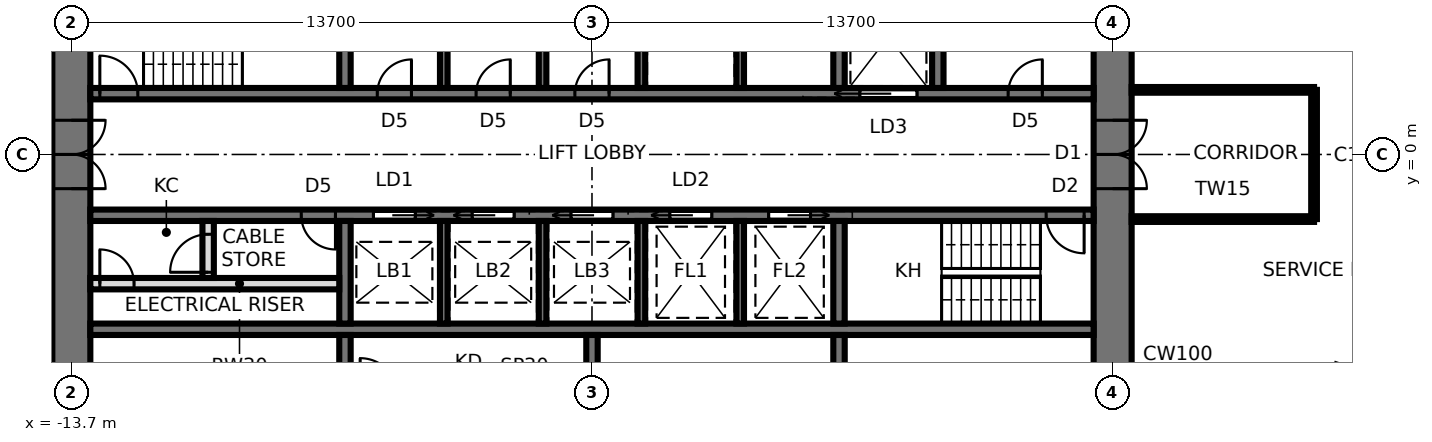
"""IFC4 building model, lengths in metres.
Left out: names, types, materials, properties, quantities, classifications, styles, units other than length and angle.
Written with IfcOpenShell. Run it as: python <this file> out.ifc"""

import sys

from ifc_helpers import new_model, si_unit, direction, frame, frame_2d, origin, place, context, subcontext, project, spatial, rectangle, extrude, element, fill, save


model = new_model("IFC4")
c1 = context("Model", 3, precision=1e-05, world=origin(), true_north=direction((0.0, 1.0)))
c2 = subcontext(c1, "Body", "Model", "MODEL_VIEW")
j1 = project(units=[si_unit("LENGTHUNIT", "METRE"), si_unit("PLANEANGLEUNIT", "RADIAN")], contexts=[c1])
p1 = place(None, origin())
s1 = spatial("IfcSite", under=j1, at=p1, CompositionType="ELEMENT")
p2 = place(p1, origin())
s2 = spatial("IfcBuilding", under=s1, at=p2, CompositionType="ELEMENT")
p3 = place(p2, frame((0.0, 0.0, 135.3)))
s3 = spatial("IfcBuildingStorey", under=s2, at=p3, CompositionType="ELEMENT", Elevation=135.3)
p4 = place(p3, frame((13.7, -9.5, 0.0), z_axis=(0.0, 0.0, 1.0), x_axis=(0.0, 1.0, 0.0)))
e1 = element("IfcWall", 1, at=p4, inside=s3, PredefinedType="SHEAR", context=c2, shape_type="SweptSolid", body=[
    extrude(rectangle(XDim=19.0, YDim=1.0, at=frame_2d((9.5, 0.0))), origin(), (0.0, 0.0, 1.0), 3.9),
])
p5 = place(p4, frame((8.6, 0.0, 0.0)))
e2 = element("IfcOpeningElement", 2, at=p5, cuts=e1, PredefinedType="OPENING", context=c2, shape_type="SweptSolid", body=[
    extrude(rectangle(XDim=1.8, YDim=2.4, at=frame_2d((0.9, 1.2))), frame((0.0, 0.51, 0.0), z_axis=(0.0, -1.0, 0.0), x_axis=(1.0, 0.0, 0.0)), (0.0, 0.0, 1.0), 1.02),
])
p6 = place(p3, frame((-13.7, 9.5, 0.0), z_axis=(0.0, 0.0, 1.0), x_axis=(0.0, -1.0, 0.0)))
e3 = element("IfcWall", 3, at=p6, inside=s3, PredefinedType="SHEAR", context=c2, shape_type="SweptSolid", body=[
    extrude(rectangle(XDim=19.0, YDim=1.0, at=frame_2d((9.5, 0.0))), origin(), (0.0, 0.0, 1.0), 3.9),
])
p7 = place(p6, frame((8.6, 0.0, 0.0)))
e4 = element("IfcOpeningElement", 4, at=p7, cuts=e3, PredefinedType="OPENING", context=c2, shape_type="SweptSolid", body=[
    extrude(rectangle(XDim=1.8, YDim=2.4, at=frame_2d((0.9, 1.2))), frame((0.0, 0.51, 0.0), z_axis=(0.0, -1.0, 0.0), x_axis=(1.0, 0.0, 0.0)), (0.0, 0.0, 1.0), 1.02),
])
p8 = place(p3, frame((-13.2, 1.6, 0.0), z_axis=(0.0, 0.0, 1.0), x_axis=(1.0, 0.0, 0.0)))
e5 = element("IfcWall", 5, at=p8, inside=s3, PredefinedType="SHEAR", context=c2, shape_type="SweptSolid", body=[
    extrude(rectangle(XDim=26.4, YDim=0.3, at=frame_2d((13.2, 0.0))), origin(), (0.0, 0.0, 1.0), 3.9),
])
p9 = place(p8, frame((0.25, 0.0, 0.0)))
e6 = element("IfcOpeningElement", 6, at=p9, cuts=e5, PredefinedType="OPENING", context=c2, shape_type="SweptSolid", body=[
    extrude(rectangle(XDim=1.0, YDim=2.1, at=frame_2d((0.5, 1.05))), frame((0.0, 0.16, 0.0), z_axis=(0.0, -1.0, 0.0), x_axis=(1.0, 0.0, 0.0)), (0.0, 0.0, 1.0), 0.32),
])
p10 = place(p8, frame((20.25, 0.0, 0.0)))
e7 = element("IfcOpeningElement", 7, at=p10, cuts=e5, PredefinedType="OPENING", context=c2, shape_type="SweptSolid", body=[
    extrude(rectangle(XDim=1.5, YDim=2.4, at=frame_2d((0.75, 1.2))), frame((0.0, 0.16, 0.0), z_axis=(0.0, -1.0, 0.0), x_axis=(1.0, 0.0, 0.0)), (0.0, 0.0, 1.0), 0.32),
])
p11 = place(p8, frame((7.55, 0.0, 0.0)))
e8 = element("IfcOpeningElement", 8, at=p11, cuts=e5, PredefinedType="OPENING", context=c2, shape_type="SweptSolid", body=[
    extrude(rectangle(XDim=0.9, YDim=2.1, at=frame_2d((0.45, 1.05))), frame((0.0, 0.16, 0.0), z_axis=(0.0, -1.0, 0.0), x_axis=(1.0, 0.0, 0.0)), (0.0, 0.0, 1.0), 0.32),
])
p12 = place(p8, frame((10.15, 0.0, 0.0)))
e9 = element("IfcOpeningElement", 9, at=p12, cuts=e5, PredefinedType="OPENING", context=c2, shape_type="SweptSolid", body=[
    extrude(rectangle(XDim=0.9, YDim=2.1, at=frame_2d((0.45, 1.05))), frame((0.0, 0.16, 0.0), z_axis=(0.0, -1.0, 0.0), x_axis=(1.0, 0.0, 0.0)), (0.0, 0.0, 1.0), 0.32),
])
p13 = place(p8, frame((12.75, 0.0, 0.0)))
e10 = element("IfcOpeningElement", 10, at=p13, cuts=e5, PredefinedType="OPENING", context=c2, shape_type="SweptSolid", body=[
    extrude(rectangle(XDim=0.9, YDim=2.1, at=frame_2d((0.45, 1.05))), frame((0.0, 0.16, 0.0), z_axis=(0.0, -1.0, 0.0), x_axis=(1.0, 0.0, 0.0)), (0.0, 0.0, 1.0), 0.32),
])
p14 = place(p8, frame((24.15, 0.0, 0.0)))
e11 = element("IfcOpeningElement", 11, at=p14, cuts=e5, PredefinedType="OPENING", context=c2, shape_type="SweptSolid", body=[
    extrude(rectangle(XDim=0.9, YDim=2.1, at=frame_2d((0.45, 1.05))), frame((0.0, 0.16, 0.0), z_axis=(0.0, -1.0, 0.0), x_axis=(1.0, 0.0, 0.0)), (0.0, 0.0, 1.0), 0.32),
])
p15 = place(p3, frame((-13.2, -1.6, 0.0), z_axis=(0.0, 0.0, 1.0), x_axis=(1.0, 0.0, 0.0)))
e12 = element("IfcWall", 12, at=p15, inside=s3, PredefinedType="SHEAR", context=c2, shape_type="SweptSolid", body=[
    extrude(rectangle(XDim=26.4, YDim=0.3, at=frame_2d((13.2, 0.0))), origin(), (0.0, 0.0, 1.0), 3.9),
])
p16 = place(p15, frame((25.15, 0.0, 0.0)))
e13 = element("IfcOpeningElement", 13, at=p16, cuts=e12, PredefinedType="OPENING", context=c2, shape_type="SweptSolid", body=[
    extrude(rectangle(XDim=1.0, YDim=2.1, at=frame_2d((0.5, 1.05))), frame((0.0, 0.16, 0.0), z_axis=(0.0, -1.0, 0.0), x_axis=(1.0, 0.0, 0.0)), (0.0, 0.0, 1.0), 0.32),
])
p17 = place(p15, frame((7.45, 0.0, 0.0)))
e14 = element("IfcOpeningElement", 14, at=p17, cuts=e12, PredefinedType="OPENING", context=c2, shape_type="SweptSolid", body=[
    extrude(rectangle(XDim=1.1, YDim=2.3, at=frame_2d((0.55, 1.15))), frame((0.0, 0.16, 0.0), z_axis=(0.0, -1.0, 0.0), x_axis=(1.0, 0.0, 0.0)), (0.0, 0.0, 1.0), 0.32),
])
p18 = place(p15, frame((10.05, 0.0, 0.0)))
e15 = element("IfcOpeningElement", 15, at=p18, cuts=e12, PredefinedType="OPENING", context=c2, shape_type="SweptSolid", body=[
    extrude(rectangle(XDim=1.1, YDim=2.3, at=frame_2d((0.55, 1.15))), frame((0.0, 0.16, 0.0), z_axis=(0.0, -1.0, 0.0), x_axis=(1.0, 0.0, 0.0)), (0.0, 0.0, 1.0), 0.32),
])
p19 = place(p15, frame((12.65, 0.0, 0.0)))
e16 = element("IfcOpeningElement", 16, at=p19, cuts=e12, PredefinedType="OPENING", context=c2, shape_type="SweptSolid", body=[
    extrude(rectangle(XDim=1.1, YDim=2.3, at=frame_2d((0.55, 1.15))), frame((0.0, 0.16, 0.0), z_axis=(0.0, -1.0, 0.0), x_axis=(1.0, 0.0, 0.0)), (0.0, 0.0, 1.0), 0.32),
])
p20 = place(p15, frame((15.25, 0.0, 0.0)))
e17 = element("IfcOpeningElement", 17, at=p20, cuts=e12, PredefinedType="OPENING", context=c2, shape_type="SweptSolid", body=[
    extrude(rectangle(XDim=1.1, YDim=2.3, at=frame_2d((0.55, 1.15))), frame((0.0, 0.16, 0.0), z_axis=(0.0, -1.0, 0.0), x_axis=(1.0, 0.0, 0.0)), (0.0, 0.0, 1.0), 0.32),
])
p21 = place(p15, frame((17.85, 0.0, 0.0)))
e18 = element("IfcOpeningElement", 18, at=p21, cuts=e12, PredefinedType="OPENING", context=c2, shape_type="SweptSolid", body=[
    extrude(rectangle(XDim=1.1, YDim=2.3, at=frame_2d((0.55, 1.15))), frame((0.0, 0.16, 0.0), z_axis=(0.0, -1.0, 0.0), x_axis=(1.0, 0.0, 0.0)), (0.0, 0.0, 1.0), 0.32),
])
p22 = place(p15, frame((5.55, 0.0, 0.0)))
e19 = element("IfcOpeningElement", 19, at=p22, cuts=e12, PredefinedType="OPENING", context=c2, shape_type="SweptSolid", body=[
    extrude(rectangle(XDim=0.9, YDim=2.1, at=frame_2d((0.45, 1.05))), frame((0.0, 0.16, 0.0), z_axis=(0.0, -1.0, 0.0), x_axis=(1.0, 0.0, 0.0)), (0.0, 0.0, 1.0), 0.32),
])
p23 = place(p3, frame((-13.2, -4.6, 0.0), z_axis=(0.0, 0.0, 1.0), x_axis=(1.0, 0.0, 0.0)))
e20 = element("IfcWall", 20, at=p23, inside=s3, PredefinedType="SHEAR", context=c2, shape_type="SweptSolid", body=[
    extrude(rectangle(XDim=26.4, YDim=0.3, at=frame_2d((13.2, 0.0))), origin(), (0.0, 0.0, 1.0), 3.9),
])
for number, where, z_axis, x_axis in (
    (21, (-6.5, 1.75, 0.0), (0.0, 0.0, 1.0), (0.0, 1.0, 0.0)),
    (22, (6.5, 1.75, 0.0), (0.0, 0.0, 1.0), (0.0, 1.0, 0.0)),
):
    element("IfcWall", number, at=place(p3, frame(where, z_axis=z_axis, x_axis=x_axis)), inside=s3, PredefinedType="SHEAR", context=c2, shape_type="SweptSolid", body=[
        extrude(rectangle(XDim=2.7, YDim=0.3, at=frame_2d((1.35, 0.0))), origin(), (0.0, 0.0, 1.0), 3.9),
    ])
for number, where, z_axis, x_axis in (
    (23, (-3.9, 1.75, 0.0), (0.0, 0.0, 1.0), (0.0, 1.0, 0.0)),
    (24, (-1.3, 1.75, 0.0), (0.0, 0.0, 1.0), (0.0, 1.0, 0.0)),
    (25, (1.3, 1.75, 0.0), (0.0, 0.0, 1.0), (0.0, 1.0, 0.0)),
    (26, (3.9, 1.75, 0.0), (0.0, 0.0, 1.0), (0.0, 1.0, 0.0)),
):
    element("IfcWall", number, at=place(p3, frame(where, z_axis=z_axis, x_axis=x_axis)), inside=s3, PredefinedType="SHEAR", context=c2, shape_type="SweptSolid", body=[
        extrude(rectangle(XDim=2.7, YDim=0.2, at=frame_2d((1.35, 0.0))), origin(), (0.0, 0.0, 1.0), 3.9),
    ])
p24 = place(p3, frame((-6.5, -1.75, 0.0), z_axis=(0.0, 0.0, 1.0), x_axis=(0.0, -1.0, 0.0)))
e27 = element("IfcWall", 27, at=p24, inside=s3, PredefinedType="SHEAR", context=c2, shape_type="SweptSolid", body=[
    extrude(rectangle(XDim=2.7, YDim=0.3, at=frame_2d((1.35, 0.0))), origin(), (0.0, 0.0, 1.0), 3.9),
])
p25 = place(p3, frame((-6.5, -4.75, 0.0), z_axis=(0.0, 0.0, 1.0), x_axis=(0.0, -1.0, 0.0)))
e28 = element("IfcWall", 28, at=p25, inside=s3, PredefinedType="SHEAR", context=c2, shape_type="SweptSolid", body=[
    extrude(rectangle(XDim=3.75, YDim=0.3, at=frame_2d((1.875, 0.0))), origin(), (0.0, 0.0, 1.0), 3.9),
])
p26 = place(p3, frame((6.5, -1.75, 0.0), z_axis=(0.0, 0.0, 1.0), x_axis=(0.0, -1.0, 0.0)))
e29 = element("IfcWall", 29, at=p26, inside=s3, PredefinedType="SHEAR", context=c2, shape_type="SweptSolid", body=[
    extrude(rectangle(XDim=2.7, YDim=0.3, at=frame_2d((1.35, 0.0))), origin(), (0.0, 0.0, 1.0), 3.9),
])
p27 = place(p3, frame((6.5, -4.75, 0.0), z_axis=(0.0, 0.0, 1.0), x_axis=(0.0, -1.0, 0.0)))
e30 = element("IfcWall", 30, at=p27, inside=s3, PredefinedType="SHEAR", context=c2, shape_type="SweptSolid", body=[
    extrude(rectangle(XDim=3.75, YDim=0.3, at=frame_2d((1.875, 0.0))), origin(), (0.0, 0.0, 1.0), 3.9),
])
for number, where, z_axis, x_axis in (
    (31, (-3.9, -1.75, 0.0), (0.0, 0.0, 1.0), (0.0, -1.0, 0.0)),
    (32, (-1.3, -1.75, 0.0), (0.0, 0.0, 1.0), (0.0, -1.0, 0.0)),
    (33, (1.3, -1.75, 0.0), (0.0, 0.0, 1.0), (0.0, -1.0, 0.0)),
    (34, (3.9, -1.75, 0.0), (0.0, 0.0, 1.0), (0.0, -1.0, 0.0)),
):
    element("IfcWall", number, at=place(p3, frame(where, z_axis=z_axis, x_axis=x_axis)), inside=s3, PredefinedType="SHEAR", context=c2, shape_type="SweptSolid", body=[
        extrude(rectangle(XDim=2.7, YDim=0.2, at=frame_2d((1.35, 0.0))), origin(), (0.0, 0.0, 1.0), 3.9),
    ])
p28 = place(p3, frame((0.0, -4.75, 0.0), z_axis=(0.0, 0.0, 1.0), x_axis=(0.0, -1.0, 0.0)))
e35 = element("IfcWall", 35, at=p28, inside=s3, PredefinedType="SHEAR", context=c2, shape_type="SweptSolid", body=[
    extrude(rectangle(XDim=3.75, YDim=0.3, at=frame_2d((1.875, 0.0))), origin(), (0.0, 0.0, 1.0), 3.9),
])
p29 = place(p3, frame((9.1, 1.75, 0.0), z_axis=(0.0, 0.0, 1.0), x_axis=(0.0, 1.0, 0.0)))
e36 = element("IfcWall", 36, at=p29, inside=s3, PredefinedType="SHEAR", context=c2, shape_type="SweptSolid", body=[
    extrude(rectangle(XDim=2.7, YDim=0.3, at=frame_2d((1.35, 0.0))), origin(), (0.0, 0.0, 1.0), 3.9),
])
p30 = place(p3, frame((-13.2, -3.4, 0.0), z_axis=(0.0, 0.0, 1.0), x_axis=(1.0, 0.0, 0.0)))
e37 = element("IfcWall", 37, at=p30, inside=s3, PredefinedType="SOLIDWALL", context=c2, shape_type="SweptSolid", body=[
    extrude(rectangle(XDim=6.55, YDim=0.3, at=frame_2d((3.275, 0.0))), origin(), (0.0, 0.0, 1.0), 3.74),
])
p31 = place(p30, frame((0.25, 0.0, 0.0)))
e38 = element("IfcOpeningElement", 38, at=p31, cuts=e37, PredefinedType="OPENING", context=c2, shape_type="SweptSolid", body=[
    extrude(rectangle(XDim=0.9, YDim=2.1, at=frame_2d((0.45, 1.05))), frame((0.0, 0.16, 0.0), z_axis=(0.0, -1.0, 0.0), x_axis=(1.0, 0.0, 0.0)), (0.0, 0.0, 1.0), 0.32),
])
p32 = place(p3, frame((-10.1, -3.25, 0.0), z_axis=(0.0, 0.0, 1.0), x_axis=(0.0, 1.0, 0.0)))
e39 = element("IfcWall", 39, at=p32, inside=s3, PredefinedType="PARTITIONING", context=c2, shape_type="SweptSolid", body=[
    extrude(rectangle(XDim=1.5, YDim=0.3, at=frame_2d((0.75, 0.0))), origin(), (0.0, 0.0, 1.0), 3.74),
])
p33 = place(p32, frame((0.15, 0.0, 0.0)))
e40 = element("IfcOpeningElement", 40, at=p33, cuts=e39, PredefinedType="OPENING", context=c2, shape_type="SweptSolid", body=[
    extrude(rectangle(XDim=1.0, YDim=2.4, at=frame_2d((0.5, 1.2))), frame((0.0, 0.16, 0.0), z_axis=(0.0, -1.0, 0.0), x_axis=(1.0, 0.0, 0.0)), (0.0, 0.0, 1.0), 0.32),
])
p34 = place(p3, frame((14.2, -1.7, 0.0), z_axis=(0.0, 0.0, 1.0), x_axis=(1.0, 0.0, 0.0)))
e41 = element("IfcWall", 41, at=p34, inside=s3, PredefinedType="PARTITIONING", context=c2, shape_type="SweptSolid", body=[
    extrude(rectangle(XDim=4.8, YDim=0.15, at=frame_2d((2.4, 0.0))), origin(), (0.0, 0.0, 1.0), 3.74),
])
p35 = place(p3, frame((19.0, -1.7, 0.0), z_axis=(0.0, 0.0, 1.0), x_axis=(0.0, 1.0, 0.0)))
e42 = element("IfcWall", 42, at=p35, inside=s3, PredefinedType="PARTITIONING", context=c2, shape_type="SweptSolid", body=[
    extrude(rectangle(XDim=3.4, YDim=0.15, at=frame_2d((1.7, 0.0))), origin(), (0.0, 0.0, 1.0), 3.286),
])
p36 = place(p3, frame((19.0, 1.7, 0.0), z_axis=(0.0, 0.0, 1.0), x_axis=(-1.0, 0.0, 0.0)))
e43 = element("IfcWall", 43, at=p36, inside=s3, PredefinedType="PARTITIONING", context=c2, shape_type="SweptSolid", body=[
    extrude(rectangle(XDim=4.8, YDim=0.15, at=frame_2d((2.4, 0.0))), origin(), (0.0, 0.0, 1.0), 3.74),
])
p37 = place(p7, origin())
e44 = element("IfcDoor", 44, at=p37, inside=s3, OperationType="DOUBLE_DOOR_SINGLE_SWING", PredefinedType="DOOR", context=c2, shape_type="SweptSolid", body=[
    extrude(rectangle(XDim=1.72, YDim=2.36, at=frame_2d((0.9, 1.18))), frame((0.0, 0.025, 0.0), z_axis=(0.0, -1.0, 0.0), x_axis=(1.0, 0.0, 0.0)), (0.0, 0.0, 1.0), 0.05),
    extrude(rectangle(XDim=0.04, YDim=2.4, at=frame_2d((0.02, 1.2))), frame((0.0, 0.25, 0.0), z_axis=(0.0, -1.0, 0.0), x_axis=(1.0, 0.0, 0.0)), (0.0, 0.0, 1.0), 0.5),
    extrude(rectangle(XDim=0.04, YDim=2.4, at=frame_2d((1.78, 1.2))), frame((0.0, 0.25, 0.0), z_axis=(0.0, -1.0, 0.0), x_axis=(1.0, 0.0, 0.0)), (0.0, 0.0, 1.0), 0.5),
    extrude(rectangle(XDim=1.72, YDim=0.04, at=frame_2d((0.9, 2.38))), frame((0.0, 0.25, 0.0), z_axis=(0.0, -1.0, 0.0), x_axis=(1.0, 0.0, 0.0)), (0.0, 0.0, 1.0), 0.5),
])
fill(e4, e44)
p38 = place(p5, frame((1.8, 0.0, 0.0), z_axis=(0.0, 0.0, 1.0), x_axis=(-1.0, 0.0, 0.0)))
e45 = element("IfcDoor", 45, at=p38, inside=s3, OperationType="DOUBLE_DOOR_SINGLE_SWING", PredefinedType="DOOR", context=c2, shape_type="SweptSolid", body=[
    extrude(rectangle(XDim=1.72, YDim=2.36, at=frame_2d((0.9, 1.18))), frame((0.0, 0.025, 0.0), z_axis=(0.0, -1.0, 0.0), x_axis=(1.0, 0.0, 0.0)), (0.0, 0.0, 1.0), 0.05),
    extrude(rectangle(XDim=0.04, YDim=2.4, at=frame_2d((1.78, 1.2))), frame((0.0, 0.25, 0.0), z_axis=(0.0, -1.0, 0.0), x_axis=(1.0, 0.0, 0.0)), (0.0, 0.0, 1.0), 0.5),
    extrude(rectangle(XDim=0.04, YDim=2.4, at=frame_2d((0.02, 1.2))), frame((0.0, 0.25, 0.0), z_axis=(0.0, -1.0, 0.0), x_axis=(1.0, 0.0, 0.0)), (0.0, 0.0, 1.0), 0.5),
    extrude(rectangle(XDim=1.72, YDim=0.04, at=frame_2d((0.9, 2.38))), frame((0.0, 0.25, 0.0), z_axis=(0.0, -1.0, 0.0), x_axis=(1.0, 0.0, 0.0)), (0.0, 0.0, 1.0), 0.5),
])
fill(e2, e45)
p39 = place(p9, origin())
e46 = element("IfcDoor", 46, at=p39, inside=s3, OperationType="SINGLE_SWING_LEFT", PredefinedType="DOOR", context=c2, shape_type="SweptSolid", body=[
    extrude(rectangle(XDim=1.0, YDim=2.1, at=frame_2d((0.5, 1.05))), frame((0.0, 0.025, 0.0), z_axis=(0.0, -1.0, 0.0), x_axis=(1.0, 0.0, 0.0)), (0.0, 0.0, 1.0), 0.05),
])
fill(e6, e46)
p40 = place(p16, frame((1.0, 0.0, 0.0), z_axis=(0.0, 0.0, 1.0), x_axis=(-1.0, 0.0, 0.0)))
e47 = element("IfcDoor", 47, at=p40, inside=s3, OperationType="SINGLE_SWING_LEFT", PredefinedType="DOOR", context=c2, shape_type="SweptSolid", body=[
    extrude(rectangle(XDim=1.0, YDim=2.1, at=frame_2d((0.5, 1.05))), frame((0.0, 0.025, 0.0), z_axis=(0.0, -1.0, 0.0), x_axis=(1.0, 0.0, 0.0)), (0.0, 0.0, 1.0), 0.05),
])
fill(e13, e47)
p41 = place(p10, origin())
e48 = element("IfcDoor", 48, at=p41, inside=s3, OperationType="SLIDING_TO_LEFT", PredefinedType="DOOR", context=c2, shape_type="SweptSolid", body=[
    extrude(rectangle(XDim=1.5, YDim=2.4, at=frame_2d((0.75, 1.2))), frame((0.0, 0.025, 0.0), z_axis=(0.0, -1.0, 0.0), x_axis=(1.0, 0.0, 0.0)), (0.0, 0.0, 1.0), 0.05),
])
fill(e7, e48)
p42 = place(p11, origin())
e49 = element("IfcDoor", 49, at=p42, inside=s3, OperationType="SINGLE_SWING_RIGHT", PredefinedType="DOOR", context=c2, shape_type="SweptSolid", body=[
    extrude(rectangle(XDim=0.9, YDim=2.1, at=frame_2d((0.45, 1.05))), frame((0.0, 0.025, 0.0), z_axis=(0.0, -1.0, 0.0), x_axis=(1.0, 0.0, 0.0)), (0.0, 0.0, 1.0), 0.05),
])
fill(e8, e49)
p43 = place(p12, origin())
e50 = element("IfcDoor", 50, at=p43, inside=s3, OperationType="SINGLE_SWING_RIGHT", PredefinedType="DOOR", context=c2, shape_type="SweptSolid", body=[
    extrude(rectangle(XDim=0.9, YDim=2.1, at=frame_2d((0.45, 1.05))), frame((0.0, 0.025, 0.0), z_axis=(0.0, -1.0, 0.0), x_axis=(1.0, 0.0, 0.0)), (0.0, 0.0, 1.0), 0.05),
])
fill(e9, e50)
p44 = place(p13, origin())
e51 = element("IfcDoor", 51, at=p44, inside=s3, OperationType="SINGLE_SWING_RIGHT", PredefinedType="DOOR", context=c2, shape_type="SweptSolid", body=[
    extrude(rectangle(XDim=0.9, YDim=2.1, at=frame_2d((0.45, 1.05))), frame((0.0, 0.025, 0.0), z_axis=(0.0, -1.0, 0.0), x_axis=(1.0, 0.0, 0.0)), (0.0, 0.0, 1.0), 0.05),
])
fill(e10, e51)
p45 = place(p17, frame((1.1, 0.0, 0.0), z_axis=(0.0, 0.0, 1.0), x_axis=(-1.0, 0.0, 0.0)))
e52 = element("IfcDoor", 52, at=p45, inside=s3, OperationType="SLIDING_TO_LEFT", PredefinedType="DOOR", context=c2, shape_type="SweptSolid", body=[
    extrude(rectangle(XDim=1.1, YDim=2.3, at=frame_2d((0.55, 1.15))), frame((0.0, 0.025, 0.0), z_axis=(0.0, -1.0, 0.0), x_axis=(1.0, 0.0, 0.0)), (0.0, 0.0, 1.0), 0.05),
])
fill(e14, e52)
p46 = place(p18, frame((1.1, 0.0, 0.0), z_axis=(0.0, 0.0, 1.0), x_axis=(-1.0, 0.0, 0.0)))
e53 = element("IfcDoor", 53, at=p46, inside=s3, OperationType="SLIDING_TO_RIGHT", PredefinedType="DOOR", context=c2, shape_type="SweptSolid", body=[
    extrude(rectangle(XDim=1.1, YDim=2.3, at=frame_2d((0.55, 1.15))), frame((0.0, 0.025, 0.0), z_axis=(0.0, -1.0, 0.0), x_axis=(1.0, 0.0, 0.0)), (0.0, 0.0, 1.0), 0.05),
])
fill(e15, e53)
p47 = place(p19, frame((1.1, 0.0, 0.0), z_axis=(0.0, 0.0, 1.0), x_axis=(-1.0, 0.0, 0.0)))
e54 = element("IfcDoor", 54, at=p47, inside=s3, OperationType="SLIDING_TO_RIGHT", PredefinedType="DOOR", context=c2, shape_type="SweptSolid", body=[
    extrude(rectangle(XDim=1.1, YDim=2.3, at=frame_2d((0.55, 1.15))), frame((0.0, 0.025, 0.0), z_axis=(0.0, -1.0, 0.0), x_axis=(1.0, 0.0, 0.0)), (0.0, 0.0, 1.0), 0.05),
])
fill(e16, e54)
p48 = place(p20, frame((1.1, 0.0, 0.0), z_axis=(0.0, 0.0, 1.0), x_axis=(-1.0, 0.0, 0.0)))
e55 = element("IfcDoor", 55, at=p48, inside=s3, OperationType="SLIDING_TO_RIGHT", PredefinedType="DOOR", context=c2, shape_type="SweptSolid", body=[
    extrude(rectangle(XDim=1.1, YDim=2.3, at=frame_2d((0.55, 1.15))), frame((0.0, 0.025, 0.0), z_axis=(0.0, -1.0, 0.0), x_axis=(1.0, 0.0, 0.0)), (0.0, 0.0, 1.0), 0.05),
])
fill(e17, e55)
p49 = place(p21, frame((1.1, 0.0, 0.0), z_axis=(0.0, 0.0, 1.0), x_axis=(-1.0, 0.0, 0.0)))
e56 = element("IfcDoor", 56, at=p49, inside=s3, OperationType="SLIDING_TO_LEFT", PredefinedType="DOOR", context=c2, shape_type="SweptSolid", body=[
    extrude(rectangle(XDim=1.1, YDim=2.3, at=frame_2d((0.55, 1.15))), frame((0.0, 0.025, 0.0), z_axis=(0.0, -1.0, 0.0), x_axis=(1.0, 0.0, 0.0)), (0.0, 0.0, 1.0), 0.05),
])
fill(e18, e56)
p50 = place(p14, origin())
e57 = element("IfcDoor", 57, at=p50, inside=s3, OperationType="SINGLE_SWING_RIGHT", PredefinedType="DOOR", context=c2, shape_type="SweptSolid", body=[
    extrude(rectangle(XDim=0.9, YDim=2.1, at=frame_2d((0.45, 1.05))), frame((0.0, 0.025, 0.0), z_axis=(0.0, -1.0, 0.0), x_axis=(1.0, 0.0, 0.0)), (0.0, 0.0, 1.0), 0.05),
])
fill(e11, e57)
p51 = place(p22, frame((0.9, 0.0, 0.0), z_axis=(0.0, 0.0, 1.0), x_axis=(-1.0, 0.0, 0.0)))
e58 = element("IfcDoor", 58, at=p51, inside=s3, OperationType="SINGLE_SWING_LEFT", PredefinedType="DOOR", context=c2, shape_type="SweptSolid", body=[
    extrude(rectangle(XDim=0.9, YDim=2.1, at=frame_2d((0.45, 1.05))), frame((0.0, 0.025, 0.0), z_axis=(0.0, -1.0, 0.0), x_axis=(1.0, 0.0, 0.0)), (0.0, 0.0, 1.0), 0.05),
])
fill(e19, e58)
p52 = place(p31, origin())
e59 = element("IfcDoor", 59, at=p52, inside=s3, OperationType="SINGLE_SWING_LEFT", PredefinedType="DOOR", context=c2, shape_type="SweptSolid", body=[
    extrude(rectangle(XDim=0.9, YDim=2.1, at=frame_2d((0.45, 1.05))), frame((0.0, 0.025, 0.0), z_axis=(0.0, -1.0, 0.0), x_axis=(1.0, 0.0, 0.0)), (0.0, 0.0, 1.0), 0.05),
])
fill(e38, e59)
p53 = place(p33, origin())
e60 = element("IfcDoor", 60, at=p53, inside=s3, OperationType="SINGLE_SWING_LEFT", PredefinedType="DOOR", context=c2, shape_type="SweptSolid", body=[
    extrude(rectangle(XDim=1.0, YDim=2.4, at=frame_2d((0.5, 1.2))), frame((0.0, 0.025, 0.0), z_axis=(0.0, -1.0, 0.0), x_axis=(1.0, 0.0, 0.0)), (0.0, 0.0, 1.0), 0.05),
])
fill(e40, e60)
save(model, sys.argv[1])
